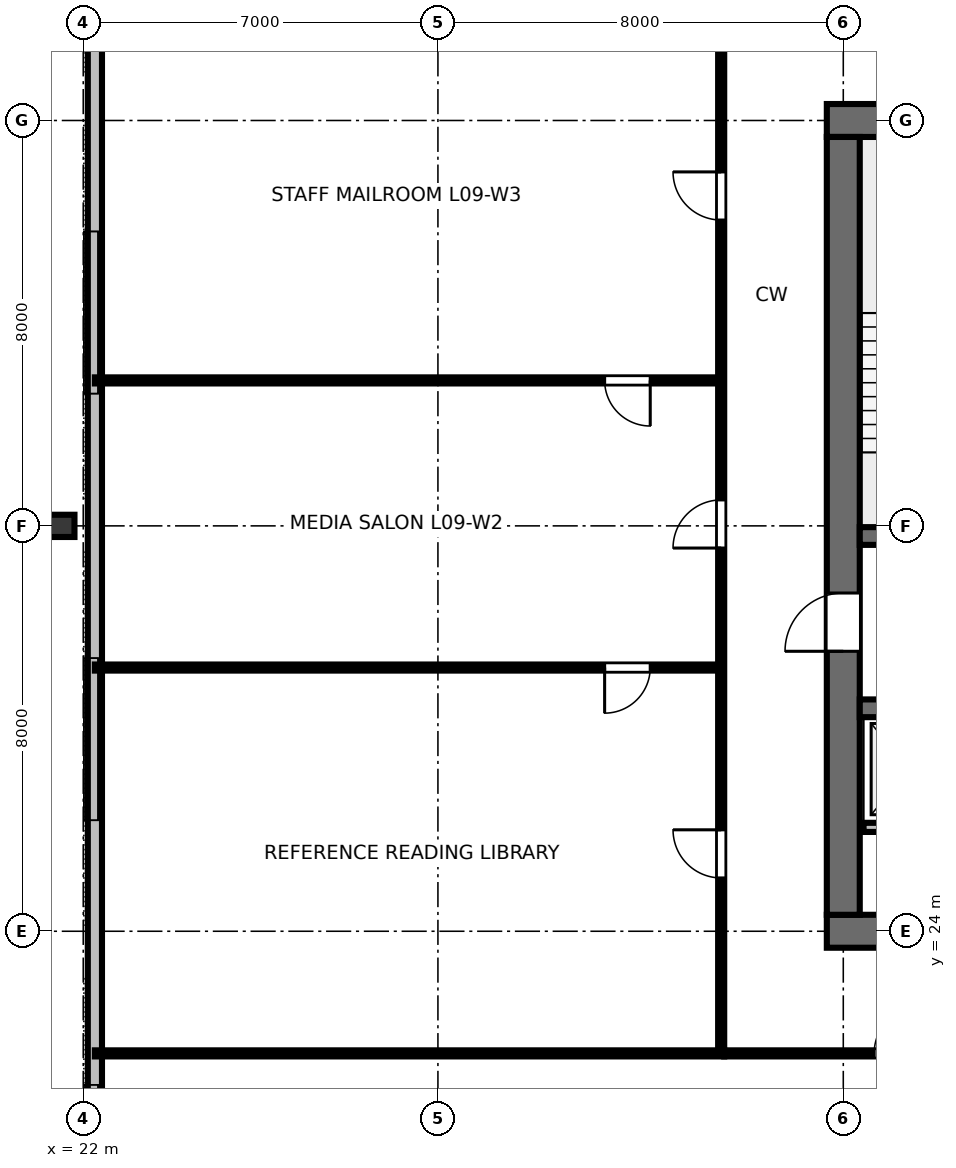
"""IFC4 building model, lengths in metres.
Left out: names, types, materials, properties, quantities, classifications, styles, units other than length and angle.
Written with IfcOpenShell. Run it as: python <this file> out.ifc"""

import sys

from ifc_helpers import new_model, si_unit, direction, frame, frame_2d, origin, origin_2d, place, context, subcontext, project, spatial, rectangle, i_section, extrude, element, fill, save


model = new_model("IFC4")
c1 = context("Model", 3, precision=1e-05, world=origin(), true_north=direction((0.0, 1.0)))
c2 = subcontext(c1, "Body", "Model", "MODEL_VIEW")
j1 = project(units=[si_unit("LENGTHUNIT", "METRE"), si_unit("PLANEANGLEUNIT", "RADIAN")], contexts=[c1])
p1 = place(None, origin())
s1 = spatial("IfcSite", under=j1, at=p1, CompositionType="ELEMENT")
p2 = place(p1, origin())
s2 = spatial("IfcBuilding", under=s1, at=p2, CompositionType="ELEMENT")
p3 = place(p2, frame((0.0, 0.0, 38.8)))
s3 = spatial("IfcBuildingStorey", under=s2, at=p3, CompositionType="ELEMENT", Elevation=38.8)
p4 = place(p3, frame((36.675, 24.0, 0.0), z_axis=(0.0, 0.0, 1.0), x_axis=(1.0, 0.0, 0.0)))
e1 = element("IfcWall", 1, at=p4, inside=s3, PredefinedType="SHEAR", context=c2, shape_type="SweptSolid", body=[
    extrude(rectangle(XDim=18.65, YDim=0.65, at=frame_2d((9.325, 0.0))), origin(), (0.0, 0.0, 1.0), 3.36),
])
p5 = place(p4, frame((5.725, 0.0, 0.0)))
e2 = element("IfcOpeningElement", 2, at=p5, cuts=e1, PredefinedType="OPENING", context=c2, shape_type="SweptSolid", body=[
    extrude(rectangle(XDim=1.6, YDim=2.15, at=frame_2d((0.8, 1.075))), frame((0.0, 0.335, 0.0), z_axis=(0.0, -1.0, 0.0), x_axis=(1.0, 0.0, 0.0)), (0.0, 0.0, 1.0), 0.67),
])
p6 = place(p4, frame((12.125, 0.0, 0.0)))
e3 = element("IfcOpeningElement", 3, at=p6, cuts=e1, PredefinedType="OPENING", context=c2, shape_type="SweptSolid", body=[
    extrude(rectangle(XDim=1.6, YDim=2.15, at=frame_2d((0.8, 1.075))), frame((0.0, 0.335, 0.0), z_axis=(0.0, -1.0, 0.0), x_axis=(1.0, 0.0, 0.0)), (0.0, 0.0, 1.0), 0.67),
])
p7 = place(p3, frame((36.675, 40.0, 0.0), z_axis=(0.0, 0.0, 1.0), x_axis=(1.0, 0.0, 0.0)))
e4 = element("IfcWall", 4, at=p7, inside=s3, PredefinedType="SHEAR", context=c2, shape_type="SweptSolid", body=[
    extrude(rectangle(XDim=18.65, YDim=0.65, at=frame_2d((9.325, 0.0))), origin(), (0.0, 0.0, 1.0), 3.36),
])
p8 = place(p7, frame((8.825, 0.0, 0.0)))
e5 = element("IfcOpeningElement", 5, at=p8, cuts=e4, PredefinedType="OPENING", context=c2, shape_type="SweptSolid", body=[
    extrude(rectangle(XDim=1.0, YDim=2.15, at=frame_2d((0.5, 1.075))), frame((0.0, 0.335, 0.0), z_axis=(0.0, -1.0, 0.0), x_axis=(1.0, 0.0, 0.0)), (0.0, 0.0, 1.0), 0.67),
])
p9 = place(p3, frame((37.0, 24.325, 0.0), z_axis=(0.0, 0.0, 1.0), x_axis=(0.0, 1.0, 0.0)))
e6 = element("IfcWall", 6, at=p9, inside=s3, PredefinedType="SHEAR", context=c2, shape_type="SweptSolid", body=[
    extrude(rectangle(XDim=15.35, YDim=0.65, at=frame_2d((7.675, 0.0))), origin(), (0.0, 0.0, 1.0), 3.36),
])
p10 = place(p9, frame((5.2, 0.0, 0.0)))
e7 = element("IfcOpeningElement", 7, at=p10, cuts=e6, PredefinedType="OPENING", context=c2, shape_type="SweptSolid", body=[
    extrude(rectangle(XDim=1.15, YDim=2.15, at=frame_2d((0.575, 1.075))), frame((0.0, 0.335, 0.0), z_axis=(0.0, -1.0, 0.0), x_axis=(1.0, 0.0, 0.0)), (0.0, 0.0, 1.0), 0.67),
])
p11 = place(p3, frame((37.325, 31.8, 0.0), z_axis=(0.0, 0.0, 1.0), x_axis=(1.0, 0.0, 0.0)))
e8 = element("IfcWall", 8, at=p11, inside=s3, PredefinedType="SHEAR", context=c2, shape_type="SweptSolid", body=[
    extrude(rectangle(XDim=17.35, YDim=0.35, at=frame_2d((8.675, 0.0))), origin(), (0.0, 0.0, 1.0), 3.36),
])
p12 = place(p11, frame((0.725, 0.0, 0.0)))
e9 = element("IfcOpeningElement", 9, at=p12, cuts=e8, PredefinedType="OPENING", context=c2, shape_type="SweptSolid", body=[
    extrude(rectangle(XDim=1.1, YDim=2.15, at=frame_2d((0.55, 1.075))), frame((0.0, 0.185, 0.0), z_axis=(0.0, -1.0, 0.0), x_axis=(1.0, 0.0, 0.0)), (0.0, 0.0, 1.0), 0.37),
])
p13 = place(p11, frame((14.625, 0.0, 0.0)))
e10 = element("IfcOpeningElement", 10, at=p13, cuts=e8, PredefinedType="OPENING", context=c2, shape_type="SweptSolid", body=[
    extrude(rectangle(XDim=1.1, YDim=2.15, at=frame_2d((0.55, 1.075))), frame((0.0, 0.185, 0.0), z_axis=(0.0, -1.0, 0.0), x_axis=(1.0, 0.0, 0.0)), (0.0, 0.0, 1.0), 0.37),
])
p14 = place(p3, frame((37.325, 28.4, 0.0), z_axis=(0.0, 0.0, 1.0), x_axis=(1.0, 0.0, 0.0)))
e11 = element("IfcWall", 11, at=p14, inside=s3, PredefinedType="SHEAR", context=c2, shape_type="SweptSolid", body=[
    extrude(rectangle(XDim=17.35, YDim=0.35, at=frame_2d((8.675, 0.0))), origin(), (0.0, 0.0, 1.0), 3.36),
])
p15 = place(p3, frame((21.57, 32.0, 0.0), z_axis=(0.0, 0.0, 1.0), x_axis=(0.0, 1.0, 0.0)))
e12 = element("IfcColumn", 12, at=p15, inside=s3, PredefinedType="COLUMN", context=c2, shape_type="SweptSolid", body=[
    extrude(i_section(OverallWidth=0.439, OverallDepth=0.514, WebThickness=0.06, FlangeThickness=0.097, FilletRadius=0.025, at=origin_2d()), origin(), (0.0, 0.0, 1.0), 3.358),
])
p16 = place(p3, frame((22.23, 49.74, 0.0), z_axis=(0.0, 0.0, 1.0), x_axis=(0.0, -1.0, 0.0)))
e13 = element("IfcWall", 13, at=p16, inside=s3, PredefinedType="STANDARD", context=c2, shape_type="SweptSolid", body=[
    extrude(rectangle(XDim=35.48, YDim=0.28, at=frame_2d((17.74, 0.0))), origin(), (0.0, 0.0, 1.0), 3.36),
])
p17 = place(p3, frame((37.4, 26.05, 0.0), z_axis=(0.0, 0.0, 1.0), x_axis=(1.0, 0.0, 0.0)))
e14 = element("IfcWall", 14, at=p17, inside=s3, PredefinedType="PARTITIONING", context=c2, shape_type="SweptSolid", body=[
    extrude(rectangle(XDim=17.2, YDim=0.18, at=frame_2d((8.6, 0.0))), origin(), (0.0, 0.0, 1.0), 3.36),
])
p18 = place(p17, frame((1.1, 0.0, 0.0)))
e15 = element("IfcOpeningElement", 15, at=p18, cuts=e14, PredefinedType="OPENING", context=c2, shape_type="SweptSolid", body=[
    extrude(rectangle(XDim=1.05, YDim=2.15, at=frame_2d((0.525, 1.075))), frame((0.0, 0.1, 0.0), z_axis=(0.0, -1.0, 0.0), x_axis=(1.0, 0.0, 0.0)), (0.0, 0.0, 1.0), 0.2),
])
p19 = place(p17, frame((3.0, 0.0, 0.0)))
e16 = element("IfcOpeningElement", 16, at=p19, cuts=e14, PredefinedType="OPENING", context=c2, shape_type="SweptSolid", body=[
    extrude(rectangle(XDim=1.05, YDim=2.15, at=frame_2d((0.525, 1.075))), frame((0.0, 0.1, 0.0), z_axis=(0.0, -1.0, 0.0), x_axis=(1.0, 0.0, 0.0)), (0.0, 0.0, 1.0), 0.2),
])
p20 = place(p3, frame((34.65, 21.59, 0.0), z_axis=(0.0, 0.0, 1.0), x_axis=(1.0, 0.0, 0.0)))
e17 = element("IfcWall", 17, at=p20, inside=s3, PredefinedType="PARTITIONING", context=c2, shape_type="SweptSolid", body=[
    extrude(rectangle(XDim=22.7, YDim=0.12, at=frame_2d((11.35, 0.0))), origin(), (0.0, 0.0, 1.0), 2.64),
])
p21 = place(p20, frame((2.959, 0.0, 0.0)))
e18 = element("IfcOpeningElement", 18, at=p21, cuts=e17, PredefinedType="OPENING", context=c2, shape_type="SweptSolid", body=[
    extrude(rectangle(XDim=0.95, YDim=2.15, at=frame_2d((0.475, 1.075))), frame((0.0, 0.07, 0.0), z_axis=(0.0, -1.0, 0.0), x_axis=(1.0, 0.0, 0.0)), (0.0, 0.0, 1.0), 0.14),
])
p22 = place(p20, frame((7.709, 0.0, 0.0)))
e19 = element("IfcOpeningElement", 19, at=p22, cuts=e17, PredefinedType="OPENING", context=c2, shape_type="SweptSolid", body=[
    extrude(rectangle(XDim=0.95, YDim=2.15, at=frame_2d((0.475, 1.075))), frame((0.0, 0.07, 0.0), z_axis=(0.0, -1.0, 0.0), x_axis=(1.0, 0.0, 0.0)), (0.0, 0.0, 1.0), 0.14),
])
p23 = place(p20, frame((11.204, 0.0, 0.0)))
e20 = element("IfcOpeningElement", 20, at=p23, cuts=e17, PredefinedType="OPENING", context=c2, shape_type="SweptSolid", body=[
    extrude(rectangle(XDim=0.95, YDim=2.15, at=frame_2d((0.475, 1.075))), frame((0.0, 0.07, 0.0), z_axis=(0.0, -1.0, 0.0), x_axis=(1.0, 0.0, 0.0)), (0.0, 0.0, 1.0), 0.14),
])
p24 = place(p20, frame((17.665, 0.0, 0.0)))
e21 = element("IfcOpeningElement", 21, at=p24, cuts=e17, PredefinedType="OPENING", context=c2, shape_type="SweptSolid", body=[
    extrude(rectangle(XDim=0.95, YDim=2.15, at=frame_2d((0.475, 1.075))), frame((0.0, 0.07, 0.0), z_axis=(0.0, -1.0, 0.0), x_axis=(1.0, 0.0, 0.0)), (0.0, 0.0, 1.0), 0.14),
])
p25 = place(p3, frame((34.59, 29.204, 0.0), z_axis=(0.0, 0.0, 1.0), x_axis=(-1.0, 0.0, 0.0)))
e22 = element("IfcWall", 22, at=p25, inside=s3, PredefinedType="PARTITIONING", context=c2, shape_type="SweptSolid", body=[
    extrude(rectangle(XDim=12.36, YDim=0.12, at=frame_2d((6.18, 0.0))), origin(), (0.0, 0.0, 1.0), 2.64),
])
p26 = place(p25, frame((1.4, 0.0, 0.0)))
e23 = element("IfcOpeningElement", 23, at=p26, cuts=e22, PredefinedType="OPENING", context=c2, shape_type="SweptSolid", body=[
    extrude(rectangle(XDim=0.9, YDim=2.15, at=frame_2d((0.45, 1.075))), frame((0.0, 0.07, 0.0), z_axis=(0.0, -1.0, 0.0), x_axis=(1.0, 0.0, 0.0)), (0.0, 0.0, 1.0), 0.14),
])
p27 = place(p3, frame((34.59, 34.871, 0.0), z_axis=(0.0, 0.0, 1.0), x_axis=(-1.0, 0.0, 0.0)))
e24 = element("IfcWall", 24, at=p27, inside=s3, PredefinedType="PARTITIONING", context=c2, shape_type="SweptSolid", body=[
    extrude(rectangle(XDim=12.36, YDim=0.12, at=frame_2d((6.18, 0.0))), origin(), (0.0, 0.0, 1.0), 2.64),
])
p28 = place(p27, frame((1.4, 0.0, 0.0)))
e25 = element("IfcOpeningElement", 25, at=p28, cuts=e24, PredefinedType="OPENING", context=c2, shape_type="SweptSolid", body=[
    extrude(rectangle(XDim=0.9, YDim=2.15, at=frame_2d((0.45, 1.075))), frame((0.0, 0.07, 0.0), z_axis=(0.0, -1.0, 0.0), x_axis=(1.0, 0.0, 0.0)), (0.0, 0.0, 1.0), 0.14),
])
p29 = place(p3, frame((34.59, 21.65, 0.0), z_axis=(0.0, 0.0, 1.0), x_axis=(0.0, 1.0, 0.0)))
e26 = element("IfcWall", 26, at=p29, inside=s3, PredefinedType="PARTITIONING", context=c2, shape_type="SweptSolid", body=[
    extrude(rectangle(XDim=20.7, YDim=0.12, at=frame_2d((10.35, 0.0))), origin(), (0.0, 0.0, 1.0), 2.64),
])
p30 = place(p29, frame((3.402, 0.0, 0.0)))
e27 = element("IfcOpeningElement", 27, at=p30, cuts=e26, PredefinedType="OPENING", context=c2, shape_type="SweptSolid", body=[
    extrude(rectangle(XDim=0.95, YDim=2.15, at=frame_2d((0.475, 1.075))), frame((0.0, 0.07, 0.0), z_axis=(0.0, -1.0, 0.0), x_axis=(1.0, 0.0, 0.0)), (0.0, 0.0, 1.0), 0.14),
])
p31 = place(p29, frame((9.912, 0.0, 0.0)))
e28 = element("IfcOpeningElement", 28, at=p31, cuts=e26, PredefinedType="OPENING", context=c2, shape_type="SweptSolid", body=[
    extrude(rectangle(XDim=0.95, YDim=2.15, at=frame_2d((0.475, 1.075))), frame((0.0, 0.07, 0.0), z_axis=(0.0, -1.0, 0.0), x_axis=(1.0, 0.0, 0.0)), (0.0, 0.0, 1.0), 0.14),
])
p32 = place(p29, frame((16.385, 0.0, 0.0)))
e29 = element("IfcOpeningElement", 29, at=p32, cuts=e26, PredefinedType="OPENING", context=c2, shape_type="SweptSolid", body=[
    extrude(rectangle(XDim=0.95, YDim=2.15, at=frame_2d((0.475, 1.075))), frame((0.0, 0.07, 0.0), z_axis=(0.0, -1.0, 0.0), x_axis=(1.0, 0.0, 0.0)), (0.0, 0.0, 1.0), 0.14),
])
p33 = place(p3, frame((34.65, 21.59, 0.0), z_axis=(0.0, 0.0, 1.0), x_axis=(-1.0, 0.0, 0.0)))
e30 = element("IfcWall", 30, at=p33, inside=s3, PredefinedType="PARTITIONING", context=c2, shape_type="SweptSolid", body=[
    extrude(rectangle(XDim=12.42, YDim=0.12, at=frame_2d((6.21, 0.0))), origin(), (0.0, 0.0, 1.0), 2.64),
])
p34 = place(p10, origin())
e31 = element("IfcDoor", 31, at=p34, inside=s3, OperationType="SINGLE_SWING_LEFT", PredefinedType="DOOR", context=c2, shape_type="SweptSolid", body=[
    extrude(rectangle(XDim=1.15, YDim=2.15, at=frame_2d((0.575, 1.075))), frame((0.0, 0.025, 0.0), z_axis=(0.0, -1.0, 0.0), x_axis=(1.0, 0.0, 0.0)), (0.0, 0.0, 1.0), 0.05),
])
fill(e7, e31)
p35 = place(p21, origin())
e32 = element("IfcDoor", 32, at=p35, inside=s3, OperationType="SINGLE_SWING_RIGHT", PredefinedType="DOOR", context=c2, shape_type="SweptSolid", body=[
    extrude(rectangle(XDim=0.95, YDim=2.15, at=frame_2d((0.475, 1.075))), frame((0.0, 0.025, 0.0), z_axis=(0.0, -1.0, 0.0), x_axis=(1.0, 0.0, 0.0)), (0.0, 0.0, 1.0), 0.05),
])
fill(e18, e32)
p36 = place(p26, origin())
e33 = element("IfcDoor", 33, at=p36, inside=s3, OperationType="SINGLE_SWING_RIGHT", PredefinedType="DOOR", context=c2, shape_type="SweptSolid", body=[
    extrude(rectangle(XDim=0.9, YDim=2.15, at=frame_2d((0.45, 1.075))), frame((0.0, 0.025, 0.0), z_axis=(0.0, -1.0, 0.0), x_axis=(1.0, 0.0, 0.0)), (0.0, 0.0, 1.0), 0.05),
])
fill(e23, e33)
p37 = place(p28, origin())
e34 = element("IfcDoor", 34, at=p37, inside=s3, OperationType="SINGLE_SWING_LEFT", PredefinedType="DOOR", context=c2, shape_type="SweptSolid", body=[
    extrude(rectangle(XDim=0.9, YDim=2.15, at=frame_2d((0.45, 1.075))), frame((0.0, 0.025, 0.0), z_axis=(0.0, -1.0, 0.0), x_axis=(1.0, 0.0, 0.0)), (0.0, 0.0, 1.0), 0.05),
])
fill(e25, e34)
p38 = place(p30, origin())
e35 = element("IfcDoor", 35, at=p38, inside=s3, OperationType="SINGLE_SWING_RIGHT", PredefinedType="DOOR", context=c2, shape_type="SweptSolid", body=[
    extrude(rectangle(XDim=0.95, YDim=2.15, at=frame_2d((0.475, 1.075))), frame((0.0, 0.025, 0.0), z_axis=(0.0, -1.0, 0.0), x_axis=(1.0, 0.0, 0.0)), (0.0, 0.0, 1.0), 0.05),
])
fill(e27, e35)
p39 = place(p31, origin())
e36 = element("IfcDoor", 36, at=p39, inside=s3, OperationType="SINGLE_SWING_LEFT", PredefinedType="DOOR", context=c2, shape_type="SweptSolid", body=[
    extrude(rectangle(XDim=0.95, YDim=2.15, at=frame_2d((0.475, 1.075))), frame((0.0, 0.025, 0.0), z_axis=(0.0, -1.0, 0.0), x_axis=(1.0, 0.0, 0.0)), (0.0, 0.0, 1.0), 0.05),
])
fill(e28, e36)
p40 = place(p32, origin())
e37 = element("IfcDoor", 37, at=p40, inside=s3, OperationType="SINGLE_SWING_RIGHT", PredefinedType="DOOR", context=c2, shape_type="SweptSolid", body=[
    extrude(rectangle(XDim=0.95, YDim=2.15, at=frame_2d((0.475, 1.075))), frame((0.0, 0.025, 0.0), z_axis=(0.0, -1.0, 0.0), x_axis=(1.0, 0.0, 0.0)), (0.0, 0.0, 1.0), 0.05),
])
fill(e29, e37)
save(model, sys.argv[1])
